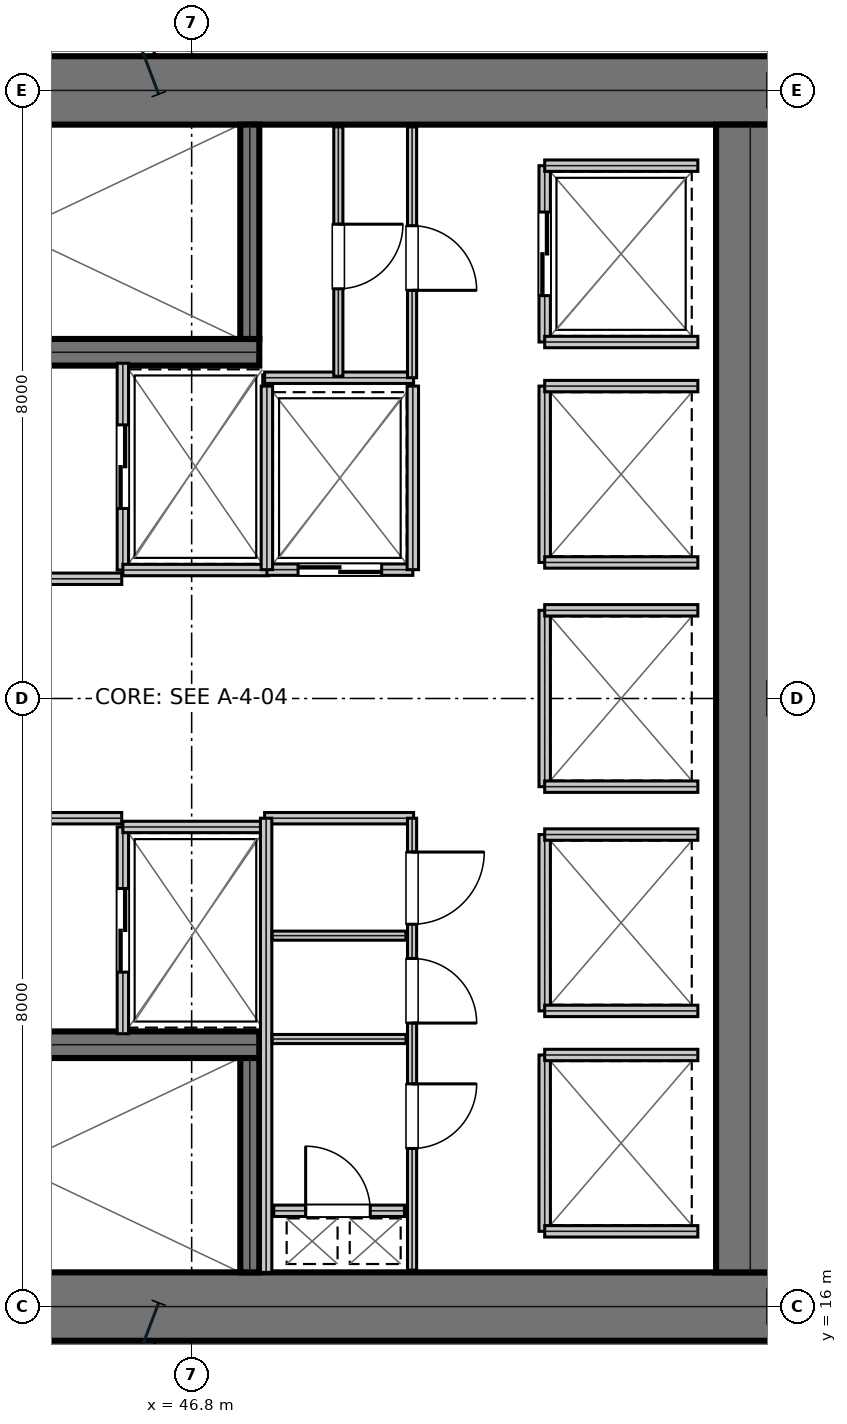
"""IFC4 building model, lengths in metres.
Left out: names, types, materials, properties, quantities, classifications, styles, units other than length and angle.
Written with IfcOpenShell. Run it as: python <this file> out.ifc"""

import sys

from ifc_helpers import new_model, si_unit, direction, frame, frame_2d, origin, place, context, subcontext, project, spatial, rectangle, extrude, element, fill, save


model = new_model("IFC4")
c1 = context("Model", 3, precision=1e-05, world=origin(), true_north=direction((0.0, 1.0)))
c2 = subcontext(c1, "Body", "Model", "MODEL_VIEW")
j1 = project(units=[si_unit("LENGTHUNIT", "METRE"), si_unit("PLANEANGLEUNIT", "RADIAN")], contexts=[c1])
p1 = place(None, origin())
s1 = spatial("IfcSite", under=j1, at=p1, CompositionType="ELEMENT")
p2 = place(p1, origin())
s2 = spatial("IfcBuilding", under=s1, at=p2, CompositionType="ELEMENT")
p3 = place(p2, frame((0.0, 0.0, 41.85)))
s3 = spatial("IfcBuildingStorey", under=s2, at=p3, CompositionType="ELEMENT", Elevation=41.85)
for number, where, z_axis, x_axis in (
    (1, (38.8, 32.0, 0.0), (0.0, 0.0, 1.0), (1.0, 0.0, 0.0)),
    (2, (38.8, 16.0, 0.0), (0.0, 0.0, 1.0), (1.0, 0.0, 0.0)),
):
    element("IfcWall", number, at=place(p3, frame(where, z_axis=z_axis, x_axis=x_axis)), inside=s3, PredefinedType="SHEAR", context=c2, shape_type="SweptSolid", body=[
        extrude(rectangle(XDim=16.0, YDim=0.9, at=frame_2d((8.0, 0.0))), origin(), (0.0, 0.0, 1.0), 3.81),
    ])
p4 = place(p3, frame((54.15, 16.45, 0.0), z_axis=(0.0, 0.0, 1.0), x_axis=(0.0, 1.0, 0.0)))
e3 = element("IfcWall", 3, at=p4, inside=s3, PredefinedType="SHEAR", context=c2, shape_type="SweptSolid", body=[
    extrude(rectangle(XDim=15.1, YDim=0.9, at=frame_2d((7.55, 0.0))), origin(), (0.0, 0.0, 1.0), 3.81),
])
p5 = place(p3, frame((39.98, 28.555, 0.0), z_axis=(0.0, 0.0, 1.0), x_axis=(1.0, 0.0, 0.0)))
e4 = element("IfcWall", 4, at=p5, inside=s3, PredefinedType="SHEAR", context=c2, shape_type="SweptSolid", body=[
    extrude(rectangle(XDim=7.71, YDim=0.35, at=frame_2d((3.855, 0.0))), origin(), (0.0, 0.0, 1.0), 3.81),
])
p6 = place(p5, frame((0.25, 0.0, 0.0)))
e5 = element("IfcOpeningElement", 5, at=p6, cuts=e4, PredefinedType="OPENING", context=c2, shape_type="SweptSolid", body=[
    extrude(rectangle(XDim=1.1, YDim=2.15, at=frame_2d((0.55, 1.075))), frame((0.0, 0.185, 0.0), z_axis=(0.0, -1.0, 0.0), x_axis=(1.0, 0.0, 0.0)), (0.0, 0.0, 1.0), 0.37),
])
p7 = place(p3, frame((39.98, 19.445, 0.0), z_axis=(0.0, 0.0, 1.0), x_axis=(1.0, 0.0, 0.0)))
e6 = element("IfcWall", 6, at=p7, inside=s3, PredefinedType="SHEAR", context=c2, shape_type="SweptSolid", body=[
    extrude(rectangle(XDim=7.71, YDim=0.35, at=frame_2d((3.855, 0.0))), origin(), (0.0, 0.0, 1.0), 3.81),
])
p8 = place(p7, frame((0.25, 0.0, 0.0)))
e7 = element("IfcOpeningElement", 7, at=p8, cuts=e6, PredefinedType="OPENING", context=c2, shape_type="SweptSolid", body=[
    extrude(rectangle(XDim=1.1, YDim=2.15, at=frame_2d((0.55, 1.075))), frame((0.0, 0.185, 0.0), z_axis=(0.0, -1.0, 0.0), x_axis=(1.0, 0.0, 0.0)), (0.0, 0.0, 1.0), 0.37),
])
for number, where, z_axis, x_axis in (
    (8, (47.565, 28.73, 0.0), (0.0, 0.0, 1.0), (0.0, 1.0, 0.0)),
    (9, (47.565, 16.45, 0.0), (0.0, 0.0, 1.0), (0.0, 1.0, 0.0)),
):
    element("IfcWall", number, at=place(p3, frame(where, z_axis=z_axis, x_axis=x_axis)), inside=s3, PredefinedType="SHEAR", context=c2, shape_type="SweptSolid", body=[
        extrude(rectangle(XDim=2.82, YDim=0.25, at=frame_2d((1.41, 0.0))), origin(), (0.0, 0.0, 1.0), 3.81),
    ])
p9 = place(p3, frame((39.98, 25.575, 0.0), z_axis=(0.0, 0.0, 1.0), x_axis=(1.0, 0.0, 0.0)))
e10 = element("IfcWall", 10, at=p9, inside=s3, PredefinedType="PARTITIONING", context=c2, shape_type="SweptSolid", body=[
    extrude(rectangle(XDim=5.9, YDim=0.15, at=frame_2d((2.95, 0.0))), origin(), (0.0, 0.0, 1.0), 3.81),
])
p10 = place(p9, frame((2.35, 0.0, 0.0)))
e11 = element("IfcOpeningElement", 11, at=p10, cuts=e10, PredefinedType="OPENING", context=c2, shape_type="SweptSolid", body=[
    extrude(rectangle(XDim=1.05, YDim=2.15, at=frame_2d((0.525, 1.075))), frame((0.0, 0.085, 0.0), z_axis=(0.0, -1.0, 0.0), x_axis=(1.0, 0.0, 0.0)), (0.0, 0.0, 1.0), 0.17),
])
p11 = place(p3, frame((39.98, 22.425, 0.0), z_axis=(0.0, 0.0, 1.0), x_axis=(1.0, 0.0, 0.0)))
e12 = element("IfcWall", 12, at=p11, inside=s3, PredefinedType="PARTITIONING", context=c2, shape_type="SweptSolid", body=[
    extrude(rectangle(XDim=5.9, YDim=0.15, at=frame_2d((2.95, 0.0))), origin(), (0.0, 0.0, 1.0), 3.81),
])
p12 = place(p11, frame((2.35, 0.0, 0.0)))
e13 = element("IfcOpeningElement", 13, at=p12, cuts=e12, PredefinedType="OPENING", context=c2, shape_type="SweptSolid", body=[
    extrude(rectangle(XDim=1.05, YDim=2.15, at=frame_2d((0.525, 1.075))), frame((0.0, 0.085, 0.0), z_axis=(0.0, -1.0, 0.0), x_axis=(1.0, 0.0, 0.0)), (0.0, 0.0, 1.0), 0.17),
])
p13 = place(p3, frame((45.895, 25.69, 0.0), z_axis=(0.0, 0.0, 1.0), x_axis=(0.0, 1.0, 0.0)))
e14 = element("IfcWall", 14, at=p13, inside=s3, PredefinedType="PARTITIONING", context=c2, shape_type="SweptSolid", body=[
    extrude(rectangle(XDim=2.72, YDim=0.15, at=frame_2d((1.36, 0.0))), origin(), (0.0, 0.0, 1.0), 3.81),
])
p14 = place(p13, frame((0.81, 0.0, 0.0)))
e15 = element("IfcOpeningElement", 15, at=p14, cuts=e14, PredefinedType="OPENING", context=c2, shape_type="SweptSolid", body=[
    extrude(rectangle(XDim=1.1, YDim=2.15, at=frame_2d((0.55, 1.075))), frame((0.0, 0.085, 0.0), z_axis=(0.0, -1.0, 0.0), x_axis=(1.0, 0.0, 0.0)), (0.0, 0.0, 1.0), 0.17),
])
p15 = place(p3, frame((45.895, 25.69, 0.0), z_axis=(0.0, 0.0, 1.0), x_axis=(1.0, 0.0, 0.0)))
e16 = element("IfcWall", 16, at=p15, inside=s3, PredefinedType="PARTITIONING", context=c2, shape_type="SweptSolid", body=[
    extrude(rectangle(XDim=1.915, YDim=0.15, at=frame_2d((0.958, 0.0))), origin(), (0.0, 0.0, 1.0), 3.81),
])
p16 = place(p3, frame((45.895, 19.59, 0.0), z_axis=(0.0, 0.0, 1.0), x_axis=(0.0, 1.0, 0.0)))
e17 = element("IfcWall", 17, at=p16, inside=s3, PredefinedType="PARTITIONING", context=c2, shape_type="SweptSolid", body=[
    extrude(rectangle(XDim=2.72, YDim=0.15, at=frame_2d((1.36, 0.0))), origin(), (0.0, 0.0, 1.0), 3.81),
])
p17 = place(p16, frame((0.81, 0.0, 0.0)))
e18 = element("IfcOpeningElement", 18, at=p17, cuts=e17, PredefinedType="OPENING", context=c2, shape_type="SweptSolid", body=[
    extrude(rectangle(XDim=1.1, YDim=2.15, at=frame_2d((0.55, 1.075))), frame((0.0, 0.085, 0.0), z_axis=(0.0, -1.0, 0.0), x_axis=(1.0, 0.0, 0.0)), (0.0, 0.0, 1.0), 0.17),
])
p18 = place(p3, frame((45.895, 22.31, 0.0), z_axis=(0.0, 0.0, 1.0), x_axis=(1.0, 0.0, 0.0)))
e19 = element("IfcWall", 19, at=p18, inside=s3, PredefinedType="PARTITIONING", context=c2, shape_type="SweptSolid", body=[
    extrude(rectangle(XDim=1.915, YDim=0.15, at=frame_2d((0.958, 0.0))), origin(), (0.0, 0.0, 1.0), 3.81),
])
p19 = place(p3, frame((47.79, 25.695, 0.0), z_axis=(0.0, 0.0, 1.0), x_axis=(1.0, 0.0, 0.0)))
e20 = element("IfcWall", 20, at=p19, inside=s3, PredefinedType="PARTITIONING", context=c2, shape_type="SweptSolid", body=[
    extrude(rectangle(XDim=1.92, YDim=0.15, at=frame_2d((0.96, 0.0))), origin(), (0.0, 0.0, 1.0), 3.81),
])
p20 = place(p19, frame((0.41, 0.0, 0.0)))
e21 = element("IfcOpeningElement", 21, at=p20, cuts=e20, PredefinedType="OPENING", context=c2, shape_type="SweptSolid", body=[
    extrude(rectangle(XDim=1.1, YDim=2.15, at=frame_2d((0.55, 1.075))), frame((0.0, 0.085, 0.0), z_axis=(0.0, -1.0, 0.0), x_axis=(1.0, 0.0, 0.0)), (0.0, 0.0, 1.0), 0.17),
])
for number, where, z_axis, x_axis in (
    (22, (47.79, 25.695, 0.0), (0.0, 0.0, 1.0), (0.0, 1.0, 0.0)),
    (23, (49.71, 25.695, 0.0), (0.0, 0.0, 1.0), (0.0, 1.0, 0.0)),
):
    element("IfcWall", number, at=place(p3, frame(where, z_axis=z_axis, x_axis=x_axis)), inside=s3, PredefinedType="PARTITIONING", context=c2, shape_type="SweptSolid", body=[
        extrude(rectangle(XDim=2.415, YDim=0.15, at=frame_2d((1.208, 0.0))), origin(), (0.0, 0.0, 1.0), 3.81),
    ])
p21 = place(p3, frame((51.445, 28.69, 0.0), z_axis=(0.0, 0.0, 1.0), x_axis=(0.0, 1.0, 0.0)))
e24 = element("IfcWall", 24, at=p21, inside=s3, PredefinedType="PARTITIONING", context=c2, shape_type="SweptSolid", body=[
    extrude(rectangle(XDim=2.32, YDim=0.15, at=frame_2d((1.16, 0.0))), origin(), (0.0, 0.0, 1.0), 3.81),
])
p22 = place(p21, frame((0.61, 0.0, 0.0)))
e25 = element("IfcOpeningElement", 25, at=p22, cuts=e24, PredefinedType="OPENING", context=c2, shape_type="SweptSolid", body=[
    extrude(rectangle(XDim=1.1, YDim=2.15, at=frame_2d((0.55, 1.075))), frame((0.0, 0.085, 0.0), z_axis=(0.0, -1.0, 0.0), x_axis=(1.0, 0.0, 0.0)), (0.0, 0.0, 1.0), 0.17),
])
for number, where, z_axis, x_axis in (
    (26, (51.445, 28.69, 0.0), (0.0, 0.0, 1.0), (1.0, 0.0, 0.0)),
    (27, (51.445, 31.01, 0.0), (0.0, 0.0, 1.0), (1.0, 0.0, 0.0)),
):
    element("IfcWall", number, at=place(p3, frame(where, z_axis=z_axis, x_axis=x_axis)), inside=s3, PredefinedType="PARTITIONING", context=c2, shape_type="SweptSolid", body=[
        extrude(rectangle(XDim=2.015, YDim=0.15, at=frame_2d((1.007, 0.0))), origin(), (0.0, 0.0, 1.0), 3.81),
    ])
p23 = place(p3, frame((51.445, 25.79, 0.0), z_axis=(0.0, 0.0, 1.0), x_axis=(0.0, 1.0, 0.0)))
e28 = element("IfcWall", 28, at=p23, inside=s3, PredefinedType="PARTITIONING", context=c2, shape_type="SweptSolid", body=[
    extrude(rectangle(XDim=2.32, YDim=0.15, at=frame_2d((1.16, 0.0))), origin(), (0.0, 0.0, 1.0), 3.81),
])
for number, where, z_axis, x_axis in (
    (29, (51.445, 25.79, 0.0), (0.0, 0.0, 1.0), (1.0, 0.0, 0.0)),
    (30, (51.445, 28.11, 0.0), (0.0, 0.0, 1.0), (1.0, 0.0, 0.0)),
):
    element("IfcWall", number, at=place(p3, frame(where, z_axis=z_axis, x_axis=x_axis)), inside=s3, PredefinedType="PARTITIONING", context=c2, shape_type="SweptSolid", body=[
        extrude(rectangle(XDim=2.015, YDim=0.15, at=frame_2d((1.007, 0.0))), origin(), (0.0, 0.0, 1.0), 3.81),
    ])
p24 = place(p3, frame((51.445, 19.89, 0.0), z_axis=(0.0, 0.0, 1.0), x_axis=(0.0, 1.0, 0.0)))
e31 = element("IfcWall", 31, at=p24, inside=s3, PredefinedType="PARTITIONING", context=c2, shape_type="SweptSolid", body=[
    extrude(rectangle(XDim=2.32, YDim=0.15, at=frame_2d((1.16, 0.0))), origin(), (0.0, 0.0, 1.0), 3.81),
])
for number, where, z_axis, x_axis in (
    (32, (51.445, 19.89, 0.0), (0.0, 0.0, 1.0), (1.0, 0.0, 0.0)),
    (33, (51.445, 22.21, 0.0), (0.0, 0.0, 1.0), (1.0, 0.0, 0.0)),
):
    element("IfcWall", number, at=place(p3, frame(where, z_axis=z_axis, x_axis=x_axis)), inside=s3, PredefinedType="PARTITIONING", context=c2, shape_type="SweptSolid", body=[
        extrude(rectangle(XDim=2.015, YDim=0.15, at=frame_2d((1.007, 0.0))), origin(), (0.0, 0.0, 1.0), 3.81),
    ])
p25 = place(p3, frame((51.445, 22.84, 0.0), z_axis=(0.0, 0.0, 1.0), x_axis=(0.0, 1.0, 0.0)))
e34 = element("IfcWall", 34, at=p25, inside=s3, PredefinedType="PARTITIONING", context=c2, shape_type="SweptSolid", body=[
    extrude(rectangle(XDim=2.32, YDim=0.15, at=frame_2d((1.16, 0.0))), origin(), (0.0, 0.0, 1.0), 3.81),
])
for number, where, z_axis, x_axis in (
    (35, (51.445, 22.84, 0.0), (0.0, 0.0, 1.0), (1.0, 0.0, 0.0)),
    (36, (51.445, 25.16, 0.0), (0.0, 0.0, 1.0), (1.0, 0.0, 0.0)),
):
    element("IfcWall", number, at=place(p3, frame(where, z_axis=z_axis, x_axis=x_axis)), inside=s3, PredefinedType="PARTITIONING", context=c2, shape_type="SweptSolid", body=[
        extrude(rectangle(XDim=2.015, YDim=0.15, at=frame_2d((1.007, 0.0))), origin(), (0.0, 0.0, 1.0), 3.81),
    ])
p26 = place(p3, frame((51.445, 16.99, 0.0), z_axis=(0.0, 0.0, 1.0), x_axis=(0.0, 1.0, 0.0)))
e37 = element("IfcWall", 37, at=p26, inside=s3, PredefinedType="PARTITIONING", context=c2, shape_type="SweptSolid", body=[
    extrude(rectangle(XDim=2.32, YDim=0.15, at=frame_2d((1.16, 0.0))), origin(), (0.0, 0.0, 1.0), 3.81),
])
for number, where, z_axis, x_axis in (
    (38, (51.445, 16.99, 0.0), (0.0, 0.0, 1.0), (1.0, 0.0, 0.0)),
    (39, (51.445, 19.31, 0.0), (0.0, 0.0, 1.0), (1.0, 0.0, 0.0)),
):
    element("IfcWall", number, at=place(p3, frame(where, z_axis=z_axis, x_axis=x_axis)), inside=s3, PredefinedType="PARTITIONING", context=c2, shape_type="SweptSolid", body=[
        extrude(rectangle(XDim=2.015, YDim=0.15, at=frame_2d((1.007, 0.0))), origin(), (0.0, 0.0, 1.0), 3.81),
    ])
p27 = place(p3, frame((47.88, 17.26, 0.0), z_axis=(0.0, 0.0, 1.0), x_axis=(1.0, 0.0, 0.0)))
e40 = element("IfcWall", 40, at=p27, inside=s3, PredefinedType="PARTITIONING", context=c2, shape_type="SweptSolid", body=[
    extrude(rectangle(XDim=1.72, YDim=0.15, at=frame_2d((0.86, 0.0))), origin(), (0.0, 0.0, 1.0), 3.81),
])
p28 = place(p27, frame((0.42, 0.0, 0.0)))
e41 = element("IfcOpeningElement", 41, at=p28, cuts=e40, PredefinedType="OPENING", context=c2, shape_type="SweptSolid", body=[
    extrude(rectangle(XDim=0.85, YDim=2.15, at=frame_2d((0.425, 1.075))), frame((0.0, 0.085, 0.0), z_axis=(0.0, -1.0, 0.0), x_axis=(1.0, 0.0, 0.0)), (0.0, 0.0, 1.0), 0.17),
])
p29 = place(p3, frame((47.76, 22.425, 0.0), z_axis=(0.0, 0.0, 1.0), x_axis=(1.0, 0.0, 0.0)))
e42 = element("IfcWall", 42, at=p29, inside=s3, PredefinedType="PARTITIONING", context=c2, shape_type="SweptSolid", body=[
    extrude(rectangle(XDim=1.96, YDim=0.15, at=frame_2d((0.98, 0.0))), origin(), (0.0, 0.0, 1.0), 3.81),
])
p30 = place(p3, frame((47.78, 16.45, 0.0), z_axis=(0.0, 0.0, 1.0), x_axis=(0.0, 1.0, 0.0)))
e43 = element("IfcWall", 43, at=p30, inside=s3, PredefinedType="PARTITIONING", context=c2, shape_type="SweptSolid", body=[
    extrude(rectangle(XDim=5.975, YDim=0.15, at=frame_2d((2.988, 0.0))), origin(), (0.0, 0.0, 1.0), 3.81),
])
for number, where, z_axis, x_axis in (
    (44, (47.86, 19.52, 0.0), (0.0, 0.0, 1.0), (1.0, 0.0, 0.0)),
    (45, (47.86, 20.88, 0.0), (0.0, 0.0, 1.0), (1.0, 0.0, 0.0)),
):
    element("IfcWall", number, at=place(p3, frame(where, z_axis=z_axis, x_axis=x_axis)), inside=s3, PredefinedType="PARTITIONING", context=c2, shape_type="SweptSolid", body=[
        extrude(rectangle(XDim=1.76, YDim=0.12, at=frame_2d((0.88, 0.0))), origin(), (0.0, 0.0, 1.0), 3.81),
    ])
p31 = place(p3, frame((49.7, 16.48, 0.0), z_axis=(0.0, 0.0, 1.0), x_axis=(0.0, 1.0, 0.0)))
e46 = element("IfcWall", 46, at=p31, inside=s3, PredefinedType="PARTITIONING", context=c2, shape_type="SweptSolid", body=[
    extrude(rectangle(XDim=5.945, YDim=0.12, at=frame_2d((2.973, 0.0))), origin(), (0.0, 0.0, 1.0), 3.81),
])
p32 = place(p31, frame((1.6, 0.0, 0.0)))
e47 = element("IfcOpeningElement", 47, at=p32, cuts=e46, PredefinedType="OPENING", context=c2, shape_type="SweptSolid", body=[
    extrude(rectangle(XDim=0.85, YDim=2.15, at=frame_2d((0.425, 1.075))), frame((0.0, 0.07, 0.0), z_axis=(0.0, -1.0, 0.0), x_axis=(1.0, 0.0, 0.0)), (0.0, 0.0, 1.0), 0.14),
])
p33 = place(p31, frame((3.25, 0.0, 0.0)))
e48 = element("IfcOpeningElement", 48, at=p33, cuts=e46, PredefinedType="OPENING", context=c2, shape_type="SweptSolid", body=[
    extrude(rectangle(XDim=0.85, YDim=2.15, at=frame_2d((0.425, 1.075))), frame((0.0, 0.07, 0.0), z_axis=(0.0, -1.0, 0.0), x_axis=(1.0, 0.0, 0.0)), (0.0, 0.0, 1.0), 0.14),
])
p34 = place(p31, frame((4.55, 0.0, 0.0)))
e49 = element("IfcOpeningElement", 49, at=p34, cuts=e46, PredefinedType="OPENING", context=c2, shape_type="SweptSolid", body=[
    extrude(rectangle(XDim=0.95, YDim=2.15, at=frame_2d((0.475, 1.075))), frame((0.0, 0.07, 0.0), z_axis=(0.0, -1.0, 0.0), x_axis=(1.0, 0.0, 0.0)), (0.0, 0.0, 1.0), 0.14),
])
p35 = place(p3, frame((47.76, 28.22, 0.0), z_axis=(0.0, 0.0, 1.0), x_axis=(1.0, 0.0, 0.0)))
e50 = element("IfcWall", 50, at=p35, inside=s3, PredefinedType="PARTITIONING", context=c2, shape_type="SweptSolid", body=[
    extrude(rectangle(XDim=1.96, YDim=0.15, at=frame_2d((0.98, 0.0))), origin(), (0.0, 0.0, 1.0), 3.81),
])
p36 = place(p3, frame((48.73, 28.24, 0.0), z_axis=(0.0, 0.0, 1.0), x_axis=(0.0, 1.0, 0.0)))
e51 = element("IfcWall", 51, at=p36, inside=s3, PredefinedType="PARTITIONING", context=c2, shape_type="SweptSolid", body=[
    extrude(rectangle(XDim=3.28, YDim=0.12, at=frame_2d((1.64, 0.0))), origin(), (0.0, 0.0, 1.0), 3.81),
])
p37 = place(p36, frame((1.15, 0.0, 0.0)))
e52 = element("IfcOpeningElement", 52, at=p37, cuts=e51, PredefinedType="OPENING", context=c2, shape_type="SweptSolid", body=[
    extrude(rectangle(XDim=0.85, YDim=2.15, at=frame_2d((0.425, 1.075))), frame((0.0, 0.07, 0.0), z_axis=(0.0, -1.0, 0.0), x_axis=(1.0, 0.0, 0.0)), (0.0, 0.0, 1.0), 0.14),
])
p38 = place(p3, frame((49.7, 28.22, 0.0), z_axis=(0.0, 0.0, 1.0), x_axis=(0.0, 1.0, 0.0)))
e53 = element("IfcWall", 53, at=p38, inside=s3, PredefinedType="PARTITIONING", context=c2, shape_type="SweptSolid", body=[
    extrude(rectangle(XDim=3.3, YDim=0.12, at=frame_2d((1.65, 0.0))), origin(), (0.0, 0.0, 1.0), 3.81),
])
p39 = place(p38, frame((1.15, 0.0, 0.0)))
e54 = element("IfcOpeningElement", 54, at=p39, cuts=e53, PredefinedType="OPENING", context=c2, shape_type="SweptSolid", body=[
    extrude(rectangle(XDim=0.85, YDim=2.15, at=frame_2d((0.425, 1.075))), frame((0.0, 0.07, 0.0), z_axis=(0.0, -1.0, 0.0), x_axis=(1.0, 0.0, 0.0)), (0.0, 0.0, 1.0), 0.14),
])
p40 = place(p14, frame((1.1, 0.0, 0.0), z_axis=(0.0, 0.0, 1.0), x_axis=(-1.0, 0.0, 0.0)))
e55 = element("IfcDoor", 55, at=p40, inside=s3, OperationType="DOUBLE_DOOR_SLIDING", PredefinedType="DOOR", context=c2, shape_type="SweptSolid", body=[
    extrude(rectangle(XDim=1.1, YDim=2.15, at=frame_2d((0.55, 1.075))), frame((0.0, 0.025, 0.0), z_axis=(0.0, -1.0, 0.0), x_axis=(1.0, 0.0, 0.0)), (0.0, 0.0, 1.0), 0.05),
])
fill(e15, e55)
p41 = place(p17, frame((1.1, 0.0, 0.0), z_axis=(0.0, 0.0, 1.0), x_axis=(-1.0, 0.0, 0.0)))
e56 = element("IfcDoor", 56, at=p41, inside=s3, OperationType="DOUBLE_DOOR_SLIDING", PredefinedType="DOOR", context=c2, shape_type="SweptSolid", body=[
    extrude(rectangle(XDim=1.1, YDim=2.15, at=frame_2d((0.55, 1.075))), frame((0.0, 0.025, 0.0), z_axis=(0.0, -1.0, 0.0), x_axis=(1.0, 0.0, 0.0)), (0.0, 0.0, 1.0), 0.05),
])
fill(e18, e56)
p42 = place(p20, frame((1.1, 0.0, 0.0), z_axis=(0.0, 0.0, 1.0), x_axis=(-1.0, 0.0, 0.0)))
e57 = element("IfcDoor", 57, at=p42, inside=s3, OperationType="DOUBLE_DOOR_SLIDING", PredefinedType="DOOR", context=c2, shape_type="SweptSolid", body=[
    extrude(rectangle(XDim=1.1, YDim=2.15, at=frame_2d((0.55, 1.075))), frame((0.0, 0.025, 0.0), z_axis=(0.0, -1.0, 0.0), x_axis=(1.0, 0.0, 0.0)), (0.0, 0.0, 1.0), 0.05),
])
fill(e21, e57)
p43 = place(p22, frame((1.1, 0.0, 0.0), z_axis=(0.0, 0.0, 1.0), x_axis=(-1.0, 0.0, 0.0)))
e58 = element("IfcDoor", 58, at=p43, inside=s3, OperationType="DOUBLE_DOOR_SLIDING", PredefinedType="DOOR", context=c2, shape_type="SweptSolid", body=[
    extrude(rectangle(XDim=1.1, YDim=2.15, at=frame_2d((0.55, 1.075))), frame((0.0, 0.025, 0.0), z_axis=(0.0, -1.0, 0.0), x_axis=(1.0, 0.0, 0.0)), (0.0, 0.0, 1.0), 0.05),
])
fill(e25, e58)
p44 = place(p28, origin())
e59 = element("IfcDoor", 59, at=p44, inside=s3, OperationType="SINGLE_SWING_LEFT", PredefinedType="TRAPDOOR", context=c2, shape_type="SweptSolid", body=[
    extrude(rectangle(XDim=0.85, YDim=2.15, at=frame_2d((0.425, 1.075))), frame((0.0, 0.025, 0.0), z_axis=(0.0, -1.0, 0.0), x_axis=(1.0, 0.0, 0.0)), (0.0, 0.0, 1.0), 0.05),
])
fill(e41, e59)
p45 = place(p32, frame((0.85, 0.0, 0.0), z_axis=(0.0, 0.0, 1.0), x_axis=(-1.0, 0.0, 0.0)))
e60 = element("IfcDoor", 60, at=p45, inside=s3, OperationType="SINGLE_SWING_LEFT", PredefinedType="DOOR", context=c2, shape_type="SweptSolid", body=[
    extrude(rectangle(XDim=0.85, YDim=2.15, at=frame_2d((0.425, 1.075))), frame((0.0, 0.025, 0.0), z_axis=(0.0, -1.0, 0.0), x_axis=(1.0, 0.0, 0.0)), (0.0, 0.0, 1.0), 0.05),
])
fill(e47, e60)
p46 = place(p33, frame((0.85, 0.0, 0.0), z_axis=(0.0, 0.0, 1.0), x_axis=(-1.0, 0.0, 0.0)))
e61 = element("IfcDoor", 61, at=p46, inside=s3, OperationType="SINGLE_SWING_RIGHT", PredefinedType="DOOR", context=c2, shape_type="SweptSolid", body=[
    extrude(rectangle(XDim=0.85, YDim=2.15, at=frame_2d((0.425, 1.075))), frame((0.0, 0.025, 0.0), z_axis=(0.0, -1.0, 0.0), x_axis=(1.0, 0.0, 0.0)), (0.0, 0.0, 1.0), 0.05),
])
fill(e48, e61)
p47 = place(p34, frame((0.95, 0.0, 0.0), z_axis=(0.0, 0.0, 1.0), x_axis=(-1.0, 0.0, 0.0)))
e62 = element("IfcDoor", 62, at=p47, inside=s3, OperationType="SINGLE_SWING_LEFT", PredefinedType="DOOR", context=c2, shape_type="SweptSolid", body=[
    extrude(rectangle(XDim=0.95, YDim=2.15, at=frame_2d((0.475, 1.075))), frame((0.0, 0.025, 0.0), z_axis=(0.0, -1.0, 0.0), x_axis=(1.0, 0.0, 0.0)), (0.0, 0.0, 1.0), 0.05),
])
fill(e49, e62)
p48 = place(p37, frame((0.85, 0.0, 0.0), z_axis=(0.0, 0.0, 1.0), x_axis=(-1.0, 0.0, 0.0)))
e63 = element("IfcDoor", 63, at=p48, inside=s3, OperationType="SINGLE_SWING_LEFT", PredefinedType="DOOR", context=c2, shape_type="SweptSolid", body=[
    extrude(rectangle(XDim=0.85, YDim=2.15, at=frame_2d((0.425, 1.075))), frame((0.0, 0.025, 0.0), z_axis=(0.0, -1.0, 0.0), x_axis=(1.0, 0.0, 0.0)), (0.0, 0.0, 1.0), 0.05),
])
fill(e52, e63)
p49 = place(p39, frame((0.85, 0.0, 0.0), z_axis=(0.0, 0.0, 1.0), x_axis=(-1.0, 0.0, 0.0)))
e64 = element("IfcDoor", 64, at=p49, inside=s3, OperationType="SINGLE_SWING_RIGHT", PredefinedType="DOOR", context=c2, shape_type="SweptSolid", body=[
    extrude(rectangle(XDim=0.85, YDim=2.15, at=frame_2d((0.425, 1.075))), frame((0.0, 0.025, 0.0), z_axis=(0.0, -1.0, 0.0), x_axis=(1.0, 0.0, 0.0)), (0.0, 0.0, 1.0), 0.05),
])
fill(e54, e64)
save(model, sys.argv[1])
